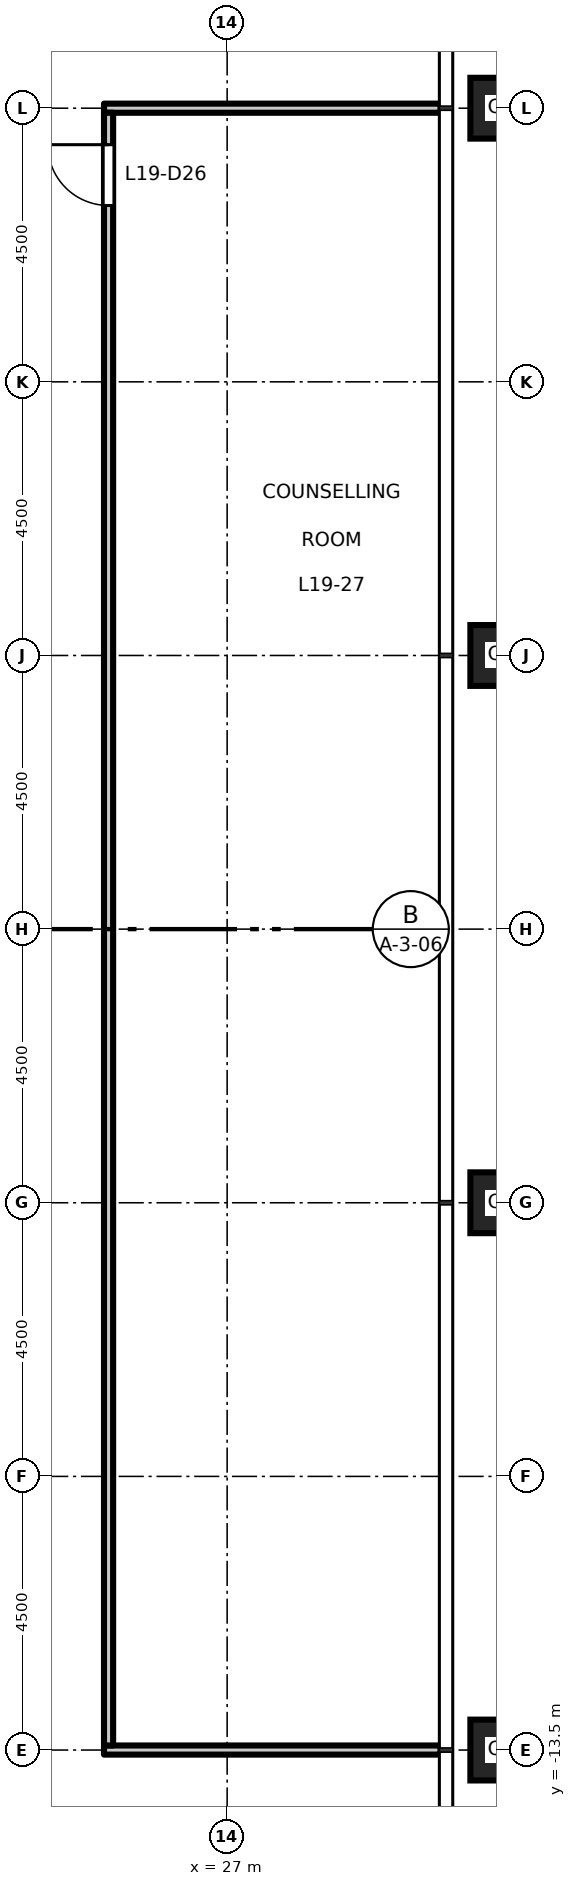
"""IFC4 building model, lengths in metres.
Left out: names, types, materials, properties, quantities, classifications, styles, units other than length and angle.
Written with IfcOpenShell. Run it as: python <this file> out.ifc"""

import sys

from ifc_helpers import new_model, si_unit, direction, frame, frame_2d, origin, origin_2d, place, context, subcontext, project, spatial, rectangle, hollow_rectangle, extrude, element, fill, save


model = new_model("IFC4")
c1 = context("Model", 3, precision=1e-05, world=origin(), true_north=direction((0.0, 1.0)))
c2 = subcontext(c1, "Body", "Model", "MODEL_VIEW")
j1 = project(units=[si_unit("LENGTHUNIT", "METRE"), si_unit("PLANEANGLEUNIT", "RADIAN")], contexts=[c1])
p1 = place(None, origin())
s1 = spatial("IfcSite", under=j1, at=p1, CompositionType="ELEMENT")
p2 = place(p1, origin())
s2 = spatial("IfcBuilding", under=s1, at=p2, CompositionType="ELEMENT")
p3 = place(p2, frame((0.0, 0.0, 89.7)))
s3 = spatial("IfcBuildingStorey", under=s2, at=p3, CompositionType="ELEMENT", Elevation=89.7)
for number, where, z_axis, x_axis in (
    (1, (31.5, -13.5, 0.0), (0.0, 0.0, 1.0), (1.0, 0.0, 0.0)),
    (2, (31.5, -4.5, 0.0), (0.0, 0.0, 1.0), (1.0, 0.0, 0.0)),
    (3, (31.5, 4.5, 0.0), (0.0, 0.0, 1.0), (1.0, 0.0, 0.0)),
    (4, (31.5, 13.5, 0.0), (0.0, 0.0, 1.0), (1.0, 0.0, 0.0)),
):
    element("IfcColumn", number, at=place(p3, frame(where, z_axis=z_axis, x_axis=x_axis)), inside=s3, PredefinedType="COLUMN", context=c2, shape_type="SweptSolid", body=[
        extrude(hollow_rectangle(XDim=1.0, YDim=1.0, WallThickness=0.06, at=origin_2d()), origin(), (0.0, 0.0, 1.0), 4.5),
    ])
for number, where, z_axis, x_axis in (
    (5, (24.975, -13.5, 0.0), (0.0, 0.0, 1.0), (1.0, 0.0, 0.0)),
    (6, (24.975, 13.5, 0.0), (0.0, 0.0, 1.0), (1.0, 0.0, 0.0)),
):
    element("IfcWall", number, at=place(p3, frame(where, z_axis=z_axis, x_axis=x_axis)), inside=s3, PredefinedType="PARTITIONING", context=c2, shape_type="SweptSolid", body=[
        extrude(rectangle(XDim=5.535, YDim=0.15, at=frame_2d((2.768, 0.0))), origin(), (0.0, 0.0, 1.0), 3.3),
    ])
p4 = place(p3, frame((25.05, -13.425, 0.0), z_axis=(0.0, 0.0, 1.0), x_axis=(0.0, 1.0, 0.0)))
e7 = element("IfcWall", 7, at=p4, inside=s3, PredefinedType="PARTITIONING", context=c2, shape_type="SweptSolid", body=[
    extrude(rectangle(XDim=26.85, YDim=0.15, at=frame_2d((13.425, 0.0))), origin(), (0.0, 0.0, 1.0), 4.3),
])
p5 = place(p4, frame((25.325, 0.0, 0.0)))
e8 = element("IfcOpeningElement", 8, at=p5, cuts=e7, PredefinedType="OPENING", context=c2, shape_type="SweptSolid", body=[
    extrude(rectangle(XDim=1.0, YDim=2.1, at=frame_2d((0.5, 1.05))), frame((0.0, 0.085, 0.0), z_axis=(0.0, -1.0, 0.0), x_axis=(1.0, 0.0, 0.0)), (0.0, 0.0, 1.0), 0.17),
])
p6 = place(p5, origin())
e9 = element("IfcDoor", 9, at=p6, inside=s3, OperationType="SINGLE_SWING_RIGHT", PredefinedType="DOOR", context=c2, shape_type="SweptSolid", body=[
    extrude(rectangle(XDim=1.0, YDim=2.1, at=frame_2d((0.5, 1.05))), frame((0.0, 0.025, 0.0), z_axis=(0.0, -1.0, 0.0), x_axis=(1.0, 0.0, 0.0)), (0.0, 0.0, 1.0), 0.05),
])
fill(e8, e9)
save(model, sys.argv[1])
